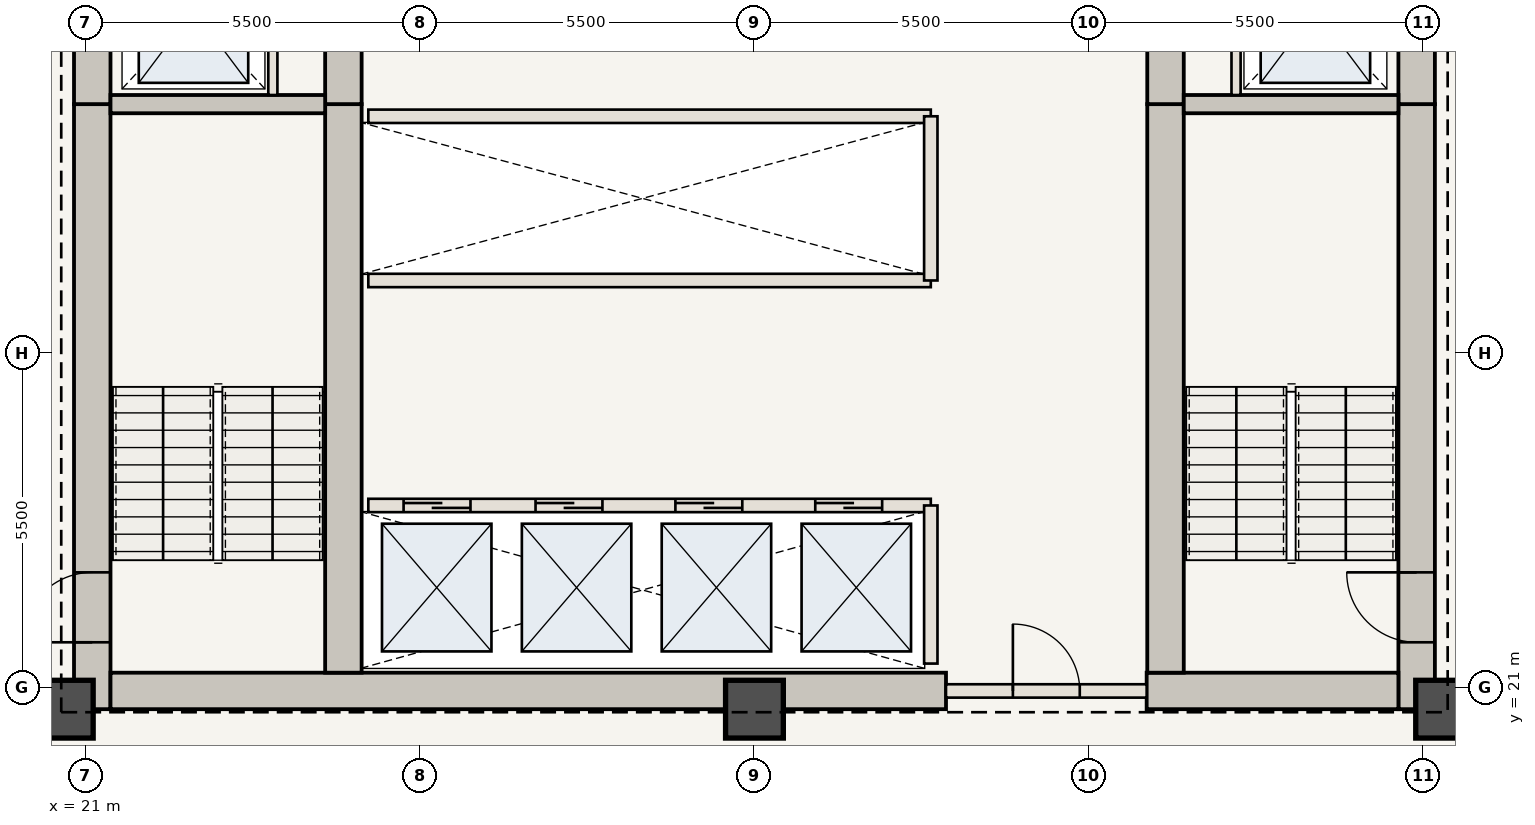
"""IFC4 building model, lengths in metres.
Left out: names, types, materials, properties, quantities, classifications, styles, units other than length and angle.
Written with IfcOpenShell. Run it as: python <this file> out.ifc"""

import sys

from ifc_helpers import new_model, si_unit, direction, frame, frame_2d, origin, origin_2d, place, context, subcontext, project, spatial, rectangle, extrude, element, fill, save


model = new_model("IFC4")
c1 = context("Model", 3, precision=1e-05, world=origin(), true_north=direction((0.0, 1.0)))
c2 = subcontext(c1, "Body", "Model", "MODEL_VIEW")
j1 = project(units=[si_unit("LENGTHUNIT", "METRE"), si_unit("PLANEANGLEUNIT", "RADIAN")], contexts=[c1])
p1 = place(None, origin())
s1 = spatial("IfcSite", under=j1, at=p1, CompositionType="ELEMENT")
p2 = place(p1, origin())
s2 = spatial("IfcBuilding", under=s1, at=p2, CompositionType="ELEMENT")
p3 = place(p2, frame((0.0, 0.0, 145.25)))
s3 = spatial("IfcBuildingStorey", under=s2, at=p3, CompositionType="ELEMENT", Elevation=145.25)
p4 = place(p3, frame((21.11, 20.65, 0.0), z_axis=(0.0, 0.0, 1.0), x_axis=(0.0, 1.0, 0.0)))
e1 = element("IfcWall", 1, at=p4, inside=s3, PredefinedType="SHEAR", context=c2, shape_type="SweptSolid", body=[
    extrude(rectangle(XDim=9.95, YDim=0.6, at=frame_2d((4.975, 0.0))), origin(), (0.0, 0.0, 1.0), 3.85),
])
p5 = place(p4, frame((1.1, 0.0, 0.0)))
e2 = element("IfcOpeningElement", 2, at=p5, cuts=e1, PredefinedType="OPENING", context=c2, shape_type="SweptSolid", body=[
    extrude(rectangle(XDim=1.15, YDim=2.15, at=frame_2d((0.575, 1.075))), frame((0.0, 0.31, 0.0), z_axis=(0.0, -1.0, 0.0), x_axis=(1.0, 0.0, 0.0)), (0.0, 0.0, 1.0), 0.62),
])
p6 = place(p3, frame((21.11, 30.6, 0.0), z_axis=(0.0, 0.0, 1.0), x_axis=(0.0, 1.0, 0.0)))
e3 = element("IfcWall", 3, at=p6, inside=s3, PredefinedType="SHEAR", context=c2, shape_type="SweptSolid", body=[
    extrude(rectangle(XDim=12.7, YDim=0.6, at=frame_2d((6.35, 0.0))), origin(), (0.0, 0.0, 1.0), 3.85),
])
p7 = place(p6, frame((4.2, 0.0, 0.0)))
e4 = element("IfcOpeningElement", 4, at=p7, cuts=e3, PredefinedType="OPENING", context=c2, shape_type="SweptSolid", body=[
    extrude(rectangle(XDim=1.1, YDim=2.15, at=frame_2d((0.55, 1.075))), frame((0.0, 0.31, 0.0), z_axis=(0.0, -1.0, 0.0), x_axis=(1.0, 0.0, 0.0)), (0.0, 0.0, 1.0), 0.62),
])
p8 = place(p6, frame((8.05, 0.0, 0.0)))
e5 = element("IfcOpeningElement", 5, at=p8, cuts=e3, PredefinedType="OPENING", context=c2, shape_type="SweptSolid", body=[
    extrude(rectangle(XDim=0.92, YDim=2.1, at=frame_2d((0.46, 1.05))), frame((0.0, 0.31, 0.0), z_axis=(0.0, -1.0, 0.0), x_axis=(1.0, 0.0, 0.0)), (0.0, 0.0, 1.0), 0.62),
])
p9 = place(p6, frame((9.45, 0.0, 0.0)))
e6 = element("IfcOpeningElement", 6, at=p9, cuts=e3, PredefinedType="OPENING", context=c2, shape_type="SweptSolid", body=[
    extrude(rectangle(XDim=0.88, YDim=2.1, at=frame_2d((0.44, 1.05))), frame((0.0, 0.31, 0.0), z_axis=(0.0, -1.0, 0.0), x_axis=(1.0, 0.0, 0.0)), (0.0, 0.0, 1.0), 0.62),
])
p10 = place(p6, frame((10.85, 0.0, 0.0)))
e7 = element("IfcOpeningElement", 7, at=p10, cuts=e3, PredefinedType="OPENING", context=c2, shape_type="SweptSolid", body=[
    extrude(rectangle(XDim=0.88, YDim=2.1, at=frame_2d((0.44, 1.05))), frame((0.0, 0.31, 0.0), z_axis=(0.0, -1.0, 0.0), x_axis=(1.0, 0.0, 0.0)), (0.0, 0.0, 1.0), 0.62),
])
p11 = place(p3, frame((42.89, 20.65, 0.0), z_axis=(0.0, 0.0, 1.0), x_axis=(0.0, 1.0, 0.0)))
e8 = element("IfcWall", 8, at=p11, inside=s3, PredefinedType="SHEAR", context=c2, shape_type="SweptSolid", body=[
    extrude(rectangle(XDim=9.95, YDim=0.6, at=frame_2d((4.975, 0.0))), origin(), (0.0, 0.0, 1.0), 3.85),
])
p12 = place(p11, frame((1.1, 0.0, 0.0)))
e9 = element("IfcOpeningElement", 9, at=p12, cuts=e8, PredefinedType="OPENING", context=c2, shape_type="SweptSolid", body=[
    extrude(rectangle(XDim=1.15, YDim=2.15, at=frame_2d((0.575, 1.075))), frame((0.0, 0.31, 0.0), z_axis=(0.0, -1.0, 0.0), x_axis=(1.0, 0.0, 0.0)), (0.0, 0.0, 1.0), 0.62),
])
p13 = place(p3, frame((42.89, 30.6, 0.0), z_axis=(0.0, 0.0, 1.0), x_axis=(0.0, 1.0, 0.0)))
e10 = element("IfcWall", 10, at=p13, inside=s3, PredefinedType="SHEAR", context=c2, shape_type="SweptSolid", body=[
    extrude(rectangle(XDim=12.7, YDim=0.6, at=frame_2d((6.35, 0.0))), origin(), (0.0, 0.0, 1.0), 3.85),
])
p14 = place(p13, frame((4.2, 0.0, 0.0)))
e11 = element("IfcOpeningElement", 11, at=p14, cuts=e10, PredefinedType="OPENING", context=c2, shape_type="SweptSolid", body=[
    extrude(rectangle(XDim=1.1, YDim=2.15, at=frame_2d((0.55, 1.075))), frame((0.0, 0.31, 0.0), z_axis=(0.0, -1.0, 0.0), x_axis=(1.0, 0.0, 0.0)), (0.0, 0.0, 1.0), 0.62),
])
p15 = place(p13, frame((9.2, 0.0, 0.0)))
e12 = element("IfcOpeningElement", 12, at=p15, cuts=e10, PredefinedType="OPENING", context=c2, shape_type="SweptSolid", body=[
    extrude(rectangle(XDim=0.92, YDim=2.1, at=frame_2d((0.46, 1.05))), frame((0.0, 0.31, 0.0), z_axis=(0.0, -1.0, 0.0), x_axis=(1.0, 0.0, 0.0)), (0.0, 0.0, 1.0), 0.62),
])
p16 = place(p3, frame((21.41, 20.95, 0.0), z_axis=(0.0, 0.0, 1.0), x_axis=(1.0, 0.0, 0.0)))
e13 = element("IfcWall", 13, at=p16, inside=s3, PredefinedType="SHEAR", context=c2, shape_type="SweptSolid", body=[
    extrude(rectangle(XDim=13.74, YDim=0.6, at=frame_2d((6.87, 0.0))), origin(), (0.0, 0.0, 1.0), 3.85),
])
p17 = place(p3, frame((38.45, 20.95, 0.0), z_axis=(0.0, 0.0, 1.0), x_axis=(1.0, 0.0, 0.0)))
e14 = element("IfcWall", 14, at=p17, inside=s3, PredefinedType="SHEAR", context=c2, shape_type="SweptSolid", body=[
    extrude(rectangle(XDim=4.14, YDim=0.6, at=frame_2d((2.07, 0.0))), origin(), (0.0, 0.0, 1.0), 3.85),
])
p18 = place(p3, frame((25.24, 21.25, 0.0), z_axis=(0.0, 0.0, 1.0), x_axis=(0.0, 1.0, 0.0)))
e15 = element("IfcWall", 15, at=p18, inside=s3, PredefinedType="SHEAR", context=c2, shape_type="SweptSolid", body=[
    extrude(rectangle(XDim=9.35, YDim=0.6, at=frame_2d((4.675, 0.0))), origin(), (0.0, 0.0, 1.0), 3.85),
])
p19 = place(p3, frame((25.24, 30.6, 0.0), z_axis=(0.0, 0.0, 1.0), x_axis=(0.0, 1.0, 0.0)))
e16 = element("IfcWall", 16, at=p19, inside=s3, PredefinedType="SHEAR", context=c2, shape_type="SweptSolid", body=[
    extrude(rectangle(XDim=12.1, YDim=0.6, at=frame_2d((6.05, 0.0))), origin(), (0.0, 0.0, 1.0), 3.85),
])
p20 = place(p19, frame((6.25, 0.0, 0.0)))
e17 = element("IfcOpeningElement", 17, at=p20, cuts=e16, PredefinedType="OPENING", context=c2, shape_type="SweptSolid", body=[
    extrude(rectangle(XDim=1.1, YDim=2.15, at=frame_2d((0.55, 1.075))), frame((0.0, 0.31, 0.0), z_axis=(0.0, -1.0, 0.0), x_axis=(1.0, 0.0, 0.0)), (0.0, 0.0, 1.0), 0.62),
])
p21 = place(p3, frame((38.76, 21.25, 0.0), z_axis=(0.0, 0.0, 1.0), x_axis=(0.0, 1.0, 0.0)))
e18 = element("IfcWall", 18, at=p21, inside=s3, PredefinedType="SHEAR", context=c2, shape_type="SweptSolid", body=[
    extrude(rectangle(XDim=9.35, YDim=0.6, at=frame_2d((4.675, 0.0))), origin(), (0.0, 0.0, 1.0), 3.85),
])
p22 = place(p3, frame((38.76, 30.6, 0.0), z_axis=(0.0, 0.0, 1.0), x_axis=(0.0, 1.0, 0.0)))
e19 = element("IfcWall", 19, at=p22, inside=s3, PredefinedType="SHEAR", context=c2, shape_type="SweptSolid", body=[
    extrude(rectangle(XDim=12.1, YDim=0.6, at=frame_2d((6.05, 0.0))), origin(), (0.0, 0.0, 1.0), 3.85),
])
for number, where, z_axis, x_axis in (
    (20, (20.65, 20.65, 0.0), (0.0, 0.0, 1.0), (1.0, 0.0, 0.0)),
    (21, (32.0, 20.65, 0.0), (0.0, 0.0, 1.0), (1.0, 0.0, 0.0)),
    (22, (43.35, 20.65, 0.0), (0.0, 0.0, 1.0), (1.0, 0.0, 0.0)),
):
    element("IfcColumn", number, at=place(p3, frame(where, z_axis=z_axis, x_axis=x_axis)), inside=s3, PredefinedType="COLUMN", context=c2, shape_type="SweptSolid", body=[
        extrude(rectangle(XDim=0.95, YDim=0.95, at=origin_2d()), origin(), (0.0, 0.0, 1.0), 3.85),
    ])
for number, where, z_axis, x_axis in (
    (23, (21.41, 30.6, 0.0), (0.0, 0.0, 1.0), (1.0, 0.0, 0.0)),
    (24, (39.06, 30.6, 0.0), (0.0, 0.0, 1.0), (1.0, 0.0, 0.0)),
):
    element("IfcWall", number, at=place(p3, frame(where, z_axis=z_axis, x_axis=x_axis)), inside=s3, PredefinedType="SHEAR", context=c2, shape_type="SweptSolid", body=[
        extrude(rectangle(XDim=3.53, YDim=0.3, at=frame_2d((1.765, 0.0))), origin(), (0.0, 0.0, 1.0), 3.685),
    ])
for number, where, z_axis, x_axis in (
    (25, (24.08, 30.75, 0.0), (0.0, 0.0, 1.0), (0.0, 1.0, 0.0)),
    (26, (39.92, 30.75, 0.0), (0.0, 0.0, 1.0), (0.0, 1.0, 0.0)),
):
    element("IfcWall", number, at=place(p3, frame(where, z_axis=z_axis, x_axis=x_axis)), inside=s3, PredefinedType="STANDARD", context=c2, shape_type="SweptSolid", body=[
        extrude(rectangle(XDim=2.65, YDim=0.15, at=frame_2d((1.325, 0.0))), origin(), (0.0, 0.0, 1.0), 3.685),
    ])
p23 = place(p3, frame((35.15, 20.95, 0.0), z_axis=(0.0, 0.0, 1.0), x_axis=(1.0, 0.0, 0.0)))
e27 = element("IfcWall", 27, at=p23, inside=s3, PredefinedType="STANDARD", context=c2, shape_type="SweptSolid", body=[
    extrude(rectangle(XDim=3.3, YDim=0.22, at=frame_2d((1.65, 0.0))), origin(), (0.0, 0.0, 1.0), 3.685),
])
p24 = place(p23, frame((1.1, 0.0, 0.0)))
e28 = element("IfcOpeningElement", 28, at=p24, cuts=e27, PredefinedType="OPENING", context=c2, shape_type="SweptSolid", body=[
    extrude(rectangle(XDim=1.1, YDim=2.15, at=frame_2d((0.55, 1.075))), frame((0.0, 0.12, 0.0), z_axis=(0.0, -1.0, 0.0), x_axis=(1.0, 0.0, 0.0)), (0.0, 0.0, 1.0), 0.24),
])
p25 = place(p3, frame((25.65, 24.0, 0.0), z_axis=(0.0, 0.0, 1.0), x_axis=(1.0, 0.0, 0.0)))
e29 = element("IfcWall", 29, at=p25, inside=s3, PredefinedType="STANDARD", context=c2, shape_type="SweptSolid", body=[
    extrude(rectangle(XDim=9.25, YDim=0.22, at=frame_2d((4.625, 0.0))), origin(), (0.0, 0.0, 1.0), 3.685),
])
p26 = place(p25, frame((0.58, 0.0, 0.0)))
e30 = element("IfcOpeningElement", 30, at=p26, cuts=e29, PredefinedType="OPENING", context=c2, shape_type="SweptSolid", body=[
    extrude(rectangle(XDim=1.1, YDim=2.15, at=frame_2d((0.55, 1.075))), frame((0.0, 0.12, 0.0), z_axis=(0.0, -1.0, 0.0), x_axis=(1.0, 0.0, 0.0)), (0.0, 0.0, 1.0), 0.24),
])
p27 = place(p25, frame((2.75, 0.0, 0.0)))
e31 = element("IfcOpeningElement", 31, at=p27, cuts=e29, PredefinedType="OPENING", context=c2, shape_type="SweptSolid", body=[
    extrude(rectangle(XDim=1.1, YDim=2.15, at=frame_2d((0.55, 1.075))), frame((0.0, 0.12, 0.0), z_axis=(0.0, -1.0, 0.0), x_axis=(1.0, 0.0, 0.0)), (0.0, 0.0, 1.0), 0.24),
])
p28 = place(p25, frame((5.05, 0.0, 0.0)))
e32 = element("IfcOpeningElement", 32, at=p28, cuts=e29, PredefinedType="OPENING", context=c2, shape_type="SweptSolid", body=[
    extrude(rectangle(XDim=1.1, YDim=2.15, at=frame_2d((0.55, 1.075))), frame((0.0, 0.12, 0.0), z_axis=(0.0, -1.0, 0.0), x_axis=(1.0, 0.0, 0.0)), (0.0, 0.0, 1.0), 0.24),
])
p29 = place(p25, frame((7.35, 0.0, 0.0)))
e33 = element("IfcOpeningElement", 33, at=p29, cuts=e29, PredefinedType="OPENING", context=c2, shape_type="SweptSolid", body=[
    extrude(rectangle(XDim=1.1, YDim=2.15, at=frame_2d((0.55, 1.075))), frame((0.0, 0.12, 0.0), z_axis=(0.0, -1.0, 0.0), x_axis=(1.0, 0.0, 0.0)), (0.0, 0.0, 1.0), 0.24),
])
p30 = place(p3, frame((34.9, 21.4, 0.0), z_axis=(0.0, 0.0, 1.0), x_axis=(0.0, 1.0, 0.0)))
e34 = element("IfcWall", 34, at=p30, inside=s3, PredefinedType="STANDARD", context=c2, shape_type="SweptSolid", body=[
    extrude(rectangle(XDim=2.6, YDim=0.22, at=frame_2d((1.3, 0.0))), origin(), (0.0, 0.0, 1.0), 3.685),
])
for number, where, z_axis, x_axis in (
    (35, (25.65, 27.7, 0.0), (0.0, 0.0, 1.0), (1.0, 0.0, 0.0)),
    (36, (25.65, 30.4, 0.0), (0.0, 0.0, 1.0), (1.0, 0.0, 0.0)),
):
    element("IfcWall", number, at=place(p3, frame(where, z_axis=z_axis, x_axis=x_axis)), inside=s3, PredefinedType="STANDARD", context=c2, shape_type="SweptSolid", body=[
        extrude(rectangle(XDim=9.25, YDim=0.22, at=frame_2d((4.625, 0.0))), origin(), (0.0, 0.0, 1.0), 3.685),
    ])
p31 = place(p3, frame((34.9, 27.7, 0.0), z_axis=(0.0, 0.0, 1.0), x_axis=(0.0, 1.0, 0.0)))
e37 = element("IfcWall", 37, at=p31, inside=s3, PredefinedType="STANDARD", context=c2, shape_type="SweptSolid", body=[
    extrude(rectangle(XDim=2.7, YDim=0.22, at=frame_2d((1.35, 0.0))), origin(), (0.0, 0.0, 1.0), 3.685),
])
p32 = place(p5, origin())
e38 = element("IfcDoor", 38, at=p32, inside=s3, OperationType="SINGLE_SWING_LEFT", PredefinedType="DOOR", context=c2, shape_type="SweptSolid", body=[
    extrude(rectangle(XDim=1.15, YDim=2.15, at=frame_2d((0.575, 1.075))), frame((0.0, 0.025, 0.0), z_axis=(0.0, -1.0, 0.0), x_axis=(1.0, 0.0, 0.0)), (0.0, 0.0, 1.0), 0.05),
])
fill(e2, e38)
p33 = place(p12, origin())
e39 = element("IfcDoor", 39, at=p33, inside=s3, OperationType="SINGLE_SWING_RIGHT", PredefinedType="DOOR", context=c2, shape_type="SweptSolid", body=[
    extrude(rectangle(XDim=1.15, YDim=2.15, at=frame_2d((0.575, 1.075))), frame((0.0, 0.025, 0.0), z_axis=(0.0, -1.0, 0.0), x_axis=(1.0, 0.0, 0.0)), (0.0, 0.0, 1.0), 0.05),
])
fill(e9, e39)
p34 = place(p24, origin())
e40 = element("IfcDoor", 40, at=p34, inside=s3, OperationType="SINGLE_SWING_LEFT", PredefinedType="DOOR", context=c2, shape_type="SweptSolid", body=[
    extrude(rectangle(XDim=1.1, YDim=2.15, at=frame_2d((0.55, 1.075))), frame((0.0, 0.025, 0.0), z_axis=(0.0, -1.0, 0.0), x_axis=(1.0, 0.0, 0.0)), (0.0, 0.0, 1.0), 0.05),
])
fill(e28, e40)
p35 = place(p26, origin())
e41 = element("IfcDoor", 41, at=p35, inside=s3, OperationType="DOUBLE_DOOR_SLIDING", PredefinedType="DOOR", context=c2, shape_type="SweptSolid", body=[
    extrude(rectangle(XDim=1.1, YDim=2.15, at=frame_2d((0.55, 1.075))), frame((0.0, 0.025, 0.0), z_axis=(0.0, -1.0, 0.0), x_axis=(1.0, 0.0, 0.0)), (0.0, 0.0, 1.0), 0.05),
])
fill(e30, e41)
p36 = place(p27, origin())
e42 = element("IfcDoor", 42, at=p36, inside=s3, OperationType="DOUBLE_DOOR_SLIDING", PredefinedType="DOOR", context=c2, shape_type="SweptSolid", body=[
    extrude(rectangle(XDim=1.1, YDim=2.15, at=frame_2d((0.55, 1.075))), frame((0.0, 0.025, 0.0), z_axis=(0.0, -1.0, 0.0), x_axis=(1.0, 0.0, 0.0)), (0.0, 0.0, 1.0), 0.05),
])
fill(e31, e42)
p37 = place(p28, origin())
e43 = element("IfcDoor", 43, at=p37, inside=s3, OperationType="DOUBLE_DOOR_SLIDING", PredefinedType="DOOR", context=c2, shape_type="SweptSolid", body=[
    extrude(rectangle(XDim=1.1, YDim=2.15, at=frame_2d((0.55, 1.075))), frame((0.0, 0.025, 0.0), z_axis=(0.0, -1.0, 0.0), x_axis=(1.0, 0.0, 0.0)), (0.0, 0.0, 1.0), 0.05),
])
fill(e32, e43)
p38 = place(p29, origin())
e44 = element("IfcDoor", 44, at=p38, inside=s3, OperationType="DOUBLE_DOOR_SLIDING", PredefinedType="DOOR", context=c2, shape_type="SweptSolid", body=[
    extrude(rectangle(XDim=1.1, YDim=2.15, at=frame_2d((0.55, 1.075))), frame((0.0, 0.025, 0.0), z_axis=(0.0, -1.0, 0.0), x_axis=(1.0, 0.0, 0.0)), (0.0, 0.0, 1.0), 0.05),
])
fill(e33, e44)
save(model, sys.argv[1])
